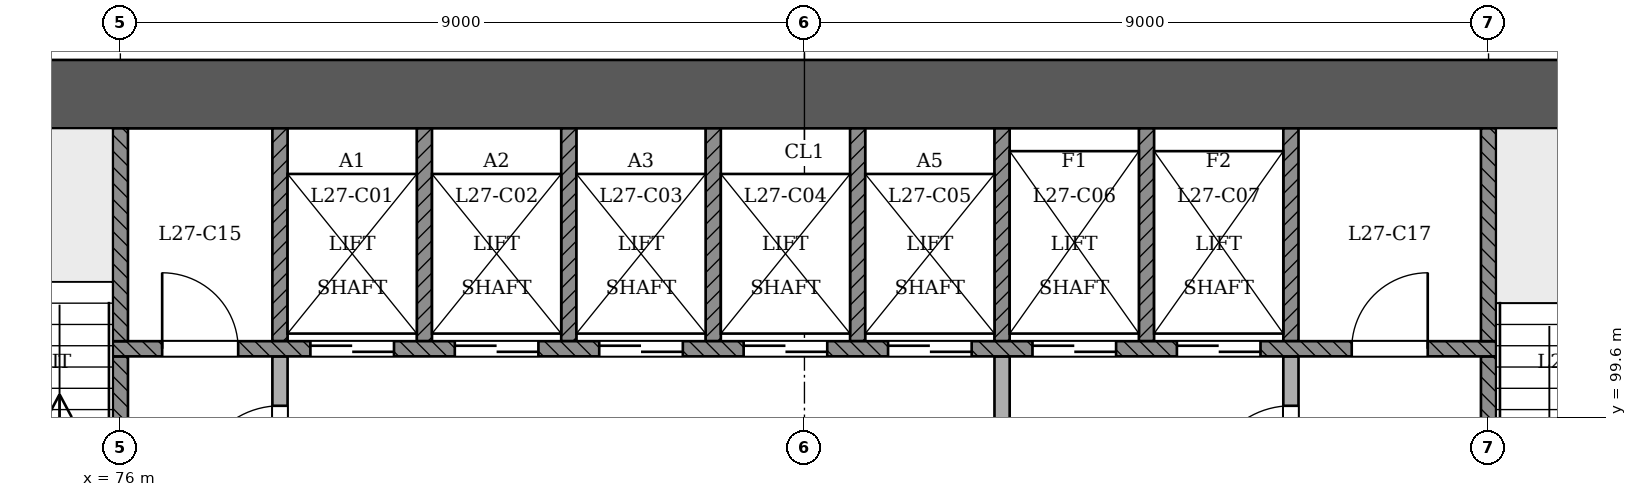
"""IFC4 building model, lengths in metres.
Left out: names, types, materials, properties, quantities, classifications, styles, units other than length and angle.
Written with IfcOpenShell. Run it as: python <this file> out.ifc"""

import sys

from ifc_helpers import new_model, si_unit, direction, frame, frame_2d, origin, place, context, subcontext, project, spatial, rectangle, extrude, element, fill, save


model = new_model("IFC4")
c1 = context("Model", 3, precision=1e-05, world=origin(), true_north=direction((0.0, 1.0)))
c2 = subcontext(c1, "Body", "Model", "MODEL_VIEW")
j1 = project(units=[si_unit("LENGTHUNIT", "METRE"), si_unit("PLANEANGLEUNIT", "RADIAN")], contexts=[c1])
p1 = place(None, origin())
s1 = spatial("IfcSite", under=j1, at=p1, CompositionType="ELEMENT")
p2 = place(p1, origin())
s2 = spatial("IfcBuilding", under=s1, at=p2, CompositionType="ELEMENT")
p3 = place(p2, frame((0.0, 0.0, 108.0)))
s3 = spatial("IfcBuildingStorey", under=s2, at=p3, CompositionType="ELEMENT", Elevation=108.0)
p4 = place(p3, frame((97.45, 103.85, 0.0), z_axis=(0.0, 0.0, 1.0), x_axis=(-1.0, 0.0, 0.0)))
e1 = element("IfcWall", 1, at=p4, inside=s3, PredefinedType="SHEAR", context=c2, shape_type="SweptSolid", body=[
    extrude(rectangle(XDim=25.35, YDim=0.9, at=frame_2d((12.675, 0.0))), origin(), (0.0, 0.0, 1.0), 3.6),
])
p5 = place(p3, frame((87.6, 93.4, 0.0), z_axis=(0.0, 0.0, 1.0), x_axis=(0.0, 1.0, 0.0)))
e2 = element("IfcWall", 2, at=p5, inside=s3, PredefinedType="PARTITIONING", context=c2, shape_type="SweptSolid", body=[
    extrude(rectangle(XDim=7.0, YDim=0.2, at=frame_2d((3.5, 0.0))), origin(), (0.0, 0.0, 1.0), 3.1),
])
p6 = place(p5, frame((4.45, 0.0, 0.0)))
e3 = element("IfcOpeningElement", 3, at=p6, cuts=e2, PredefinedType="OPENING", context=c2, shape_type="SweptSolid", body=[
    extrude(rectangle(XDim=1.1, YDim=2.1, at=frame_2d((0.55, 1.05))), frame((0.0, 0.11, 0.0), z_axis=(0.0, -1.0, 0.0), x_axis=(1.0, 0.0, 0.0)), (0.0, 0.0, 1.0), 0.221),
])
p7 = place(p3, frame((91.4, 96.2, 0.0), z_axis=(0.0, 0.0, 1.0), x_axis=(0.0, 1.0, 0.0)))
e4 = element("IfcWall", 4, at=p7, inside=s3, PredefinedType="PARTITIONING", context=c2, shape_type="SweptSolid", body=[
    extrude(rectangle(XDim=4.2, YDim=0.2, at=frame_2d((2.1, 0.0))), origin(), (0.0, 0.0, 1.0), 3.1),
])
p8 = place(p7, frame((2.45, 0.0, 0.0)))
e5 = element("IfcOpeningElement", 5, at=p8, cuts=e4, PredefinedType="OPENING", context=c2, shape_type="SweptSolid", body=[
    extrude(rectangle(XDim=1.1, YDim=2.1, at=frame_2d((0.55, 1.05))), frame((0.0, 0.11, 0.0), z_axis=(0.0, -1.0, 0.0), x_axis=(1.0, 0.0, 0.0)), (0.0, 0.0, 1.0), 0.221),
])
p9 = place(p3, frame((76.0, 96.7, 0.0), z_axis=(0.0, 0.0, 1.0), x_axis=(0.0, 1.0, 0.0)))
e6 = element("IfcWall", 6, at=p9, inside=s3, PredefinedType="SOLIDWALL", context=c2, shape_type="SweptSolid", body=[
    extrude(rectangle(XDim=3.7, YDim=0.2, at=frame_2d((1.85, 0.0))), origin(), (0.0, 0.0, 1.0), 3.1),
])
p10 = place(p9, frame((0.35, 0.0, 0.0)))
e7 = element("IfcOpeningElement", 7, at=p10, cuts=e6, PredefinedType="OPENING", context=c2, shape_type="SweptSolid", body=[
    extrude(rectangle(XDim=1.1, YDim=2.1, at=frame_2d((0.55, 1.05))), frame((0.0, 0.11, 0.0), z_axis=(0.0, -1.0, 0.0), x_axis=(1.0, 0.0, 0.0)), (0.0, 0.0, 1.0), 0.221),
])
p11 = place(p3, frame((78.1, 96.7, 0.0), z_axis=(0.0, 0.0, 1.0), x_axis=(0.0, 1.0, 0.0)))
e8 = element("IfcWall", 8, at=p11, inside=s3, PredefinedType="PARTITIONING", context=c2, shape_type="SweptSolid", body=[
    extrude(rectangle(XDim=3.7, YDim=0.2, at=frame_2d((1.85, 0.0))), origin(), (0.0, 0.0, 1.0), 3.1),
])
p12 = place(p11, frame((1.95, 0.0, 0.0)))
e9 = element("IfcOpeningElement", 9, at=p12, cuts=e8, PredefinedType="OPENING", context=c2, shape_type="SweptSolid", body=[
    extrude(rectangle(XDim=1.1, YDim=2.1, at=frame_2d((0.55, 1.05))), frame((0.0, 0.11, 0.0), z_axis=(0.0, -1.0, 0.0), x_axis=(1.0, 0.0, 0.0)), (0.0, 0.0, 1.0), 0.221),
])
p13 = place(p3, frame((94.0, 96.7, 0.0), z_axis=(0.0, 0.0, 1.0), x_axis=(0.0, 1.0, 0.0)))
e10 = element("IfcWall", 10, at=p13, inside=s3, PredefinedType="SOLIDWALL", context=c2, shape_type="SweptSolid", body=[
    extrude(rectangle(XDim=3.7, YDim=0.2, at=frame_2d((1.85, 0.0))), origin(), (0.0, 0.0, 1.0), 3.1),
])
p14 = place(p13, frame((0.35, 0.0, 0.0)))
e11 = element("IfcOpeningElement", 11, at=p14, cuts=e10, PredefinedType="OPENING", context=c2, shape_type="SweptSolid", body=[
    extrude(rectangle(XDim=1.1, YDim=2.1, at=frame_2d((0.55, 1.05))), frame((0.0, 0.11, 0.0), z_axis=(0.0, -1.0, 0.0), x_axis=(1.0, 0.0, 0.0)), (0.0, 0.0, 1.0), 0.221),
])
p15 = place(p3, frame((75.9, 100.5, 0.0), z_axis=(0.0, 0.0, 1.0), x_axis=(1.0, 0.0, 0.0)))
e12 = element("IfcWall", 12, at=p15, inside=s3, PredefinedType="SOLIDWALL", context=c2, shape_type="SweptSolid", body=[
    extrude(rectangle(XDim=18.2, YDim=0.2, at=frame_2d((9.1, 0.0))), origin(), (0.0, 0.0, 1.0), 3.1),
])
p16 = place(p15, frame((2.6, 0.0, 0.0)))
e13 = element("IfcOpeningElement", 13, at=p16, cuts=e12, PredefinedType="OPENING", context=c2, shape_type="SweptSolid", body=[
    extrude(rectangle(XDim=1.1, YDim=2.1, at=frame_2d((0.55, 1.05))), frame((0.0, 0.11, 0.0), z_axis=(0.0, -1.0, 0.0), x_axis=(1.0, 0.0, 0.0)), (0.0, 0.0, 1.0), 0.221),
])
p17 = place(p15, frame((4.5, 0.0, 0.0)))
e14 = element("IfcOpeningElement", 14, at=p17, cuts=e12, PredefinedType="OPENING", context=c2, shape_type="SweptSolid", body=[
    extrude(rectangle(XDim=1.1, YDim=2.1, at=frame_2d((0.55, 1.05))), frame((0.0, 0.11, 0.0), z_axis=(0.0, -1.0, 0.0), x_axis=(1.0, 0.0, 0.0)), (0.0, 0.0, 1.0), 0.221),
])
p18 = place(p15, frame((6.4, 0.0, 0.0)))
e15 = element("IfcOpeningElement", 15, at=p18, cuts=e12, PredefinedType="OPENING", context=c2, shape_type="SweptSolid", body=[
    extrude(rectangle(XDim=1.1, YDim=2.1, at=frame_2d((0.55, 1.05))), frame((0.0, 0.11, 0.0), z_axis=(0.0, -1.0, 0.0), x_axis=(1.0, 0.0, 0.0)), (0.0, 0.0, 1.0), 0.221),
])
p19 = place(p15, frame((8.3, 0.0, 0.0)))
e16 = element("IfcOpeningElement", 16, at=p19, cuts=e12, PredefinedType="OPENING", context=c2, shape_type="SweptSolid", body=[
    extrude(rectangle(XDim=1.1, YDim=2.1, at=frame_2d((0.55, 1.05))), frame((0.0, 0.11, 0.0), z_axis=(0.0, -1.0, 0.0), x_axis=(1.0, 0.0, 0.0)), (0.0, 0.0, 1.0), 0.221),
])
p20 = place(p15, frame((10.2, 0.0, 0.0)))
e17 = element("IfcOpeningElement", 17, at=p20, cuts=e12, PredefinedType="OPENING", context=c2, shape_type="SweptSolid", body=[
    extrude(rectangle(XDim=1.1, YDim=2.1, at=frame_2d((0.55, 1.05))), frame((0.0, 0.11, 0.0), z_axis=(0.0, -1.0, 0.0), x_axis=(1.0, 0.0, 0.0)), (0.0, 0.0, 1.0), 0.221),
])
p21 = place(p15, frame((12.1, 0.0, 0.0)))
e18 = element("IfcOpeningElement", 18, at=p21, cuts=e12, PredefinedType="OPENING", context=c2, shape_type="SweptSolid", body=[
    extrude(rectangle(XDim=1.1, YDim=2.1, at=frame_2d((0.55, 1.05))), frame((0.0, 0.11, 0.0), z_axis=(0.0, -1.0, 0.0), x_axis=(1.0, 0.0, 0.0)), (0.0, 0.0, 1.0), 0.221),
])
p22 = place(p15, frame((14.0, 0.0, 0.0)))
e19 = element("IfcOpeningElement", 19, at=p22, cuts=e12, PredefinedType="OPENING", context=c2, shape_type="SweptSolid", body=[
    extrude(rectangle(XDim=1.1, YDim=2.1, at=frame_2d((0.55, 1.05))), frame((0.0, 0.11, 0.0), z_axis=(0.0, -1.0, 0.0), x_axis=(1.0, 0.0, 0.0)), (0.0, 0.0, 1.0), 0.221),
])
p23 = place(p15, frame((0.65, 0.0, 0.0)))
e20 = element("IfcOpeningElement", 20, at=p23, cuts=e12, PredefinedType="OPENING", context=c2, shape_type="SweptSolid", body=[
    extrude(rectangle(XDim=1.0, YDim=2.1, at=frame_2d((0.5, 1.05))), frame((0.0, 0.11, 0.0), z_axis=(0.0, -1.0, 0.0), x_axis=(1.0, 0.0, 0.0)), (0.0, 0.0, 1.0), 0.221),
])
p24 = place(p15, frame((16.3, 0.0, 0.0)))
e21 = element("IfcOpeningElement", 21, at=p24, cuts=e12, PredefinedType="OPENING", context=c2, shape_type="SweptSolid", body=[
    extrude(rectangle(XDim=1.0, YDim=2.1, at=frame_2d((0.5, 1.05))), frame((0.0, 0.11, 0.0), z_axis=(0.0, -1.0, 0.0), x_axis=(1.0, 0.0, 0.0)), (0.0, 0.0, 1.0), 0.221),
])
for number, where, z_axis, x_axis in (
    (22, (76.0, 100.6, 0.0), (0.0, 0.0, 1.0), (0.0, 1.0, 0.0)),
    (23, (78.1, 100.6, 0.0), (0.0, 0.0, 1.0), (0.0, 1.0, 0.0)),
    (24, (80.0, 100.6, 0.0), (0.0, 0.0, 1.0), (0.0, 1.0, 0.0)),
    (25, (81.9, 100.6, 0.0), (0.0, 0.0, 1.0), (0.0, 1.0, 0.0)),
    (26, (83.8, 100.6, 0.0), (0.0, 0.0, 1.0), (0.0, 1.0, 0.0)),
    (27, (85.7, 100.6, 0.0), (0.0, 0.0, 1.0), (0.0, 1.0, 0.0)),
    (28, (87.6, 100.6, 0.0), (0.0, 0.0, 1.0), (0.0, 1.0, 0.0)),
    (29, (89.5, 100.6, 0.0), (0.0, 0.0, 1.0), (0.0, 1.0, 0.0)),
    (30, (91.4, 100.6, 0.0), (0.0, 0.0, 1.0), (0.0, 1.0, 0.0)),
    (31, (94.0, 100.6, 0.0), (0.0, 0.0, 1.0), (0.0, 1.0, 0.0)),
):
    element("IfcWall", number, at=place(p3, frame(where, z_axis=z_axis, x_axis=x_axis)), inside=s3, PredefinedType="SOLIDWALL", context=c2, shape_type="SweptSolid", body=[
        extrude(rectangle(XDim=2.8, YDim=0.2, at=frame_2d((1.4, 0.0))), origin(), (0.0, 0.0, 1.0), 3.1),
    ])
p25 = place(p16, origin())
e32 = element("IfcDoor", 32, at=p25, inside=s3, OperationType="SLIDING_TO_RIGHT", PredefinedType="NOTDEFINED", context=c2, shape_type="SweptSolid", body=[
    extrude(rectangle(XDim=1.1, YDim=2.1, at=frame_2d((0.55, 1.05))), frame((0.0, 0.025, 0.0), z_axis=(0.0, -1.0, 0.0), x_axis=(1.0, 0.0, 0.0)), (0.0, 0.0, 1.0), 0.05),
])
fill(e13, e32)
p26 = place(p17, origin())
e33 = element("IfcDoor", 33, at=p26, inside=s3, OperationType="SLIDING_TO_LEFT", PredefinedType="NOTDEFINED", context=c2, shape_type="SweptSolid", body=[
    extrude(rectangle(XDim=1.1, YDim=2.1, at=frame_2d((0.55, 1.05))), frame((0.0, 0.025, 0.0), z_axis=(0.0, -1.0, 0.0), x_axis=(1.0, 0.0, 0.0)), (0.0, 0.0, 1.0), 0.05),
])
fill(e14, e33)
p27 = place(p18, origin())
e34 = element("IfcDoor", 34, at=p27, inside=s3, OperationType="SLIDING_TO_RIGHT", PredefinedType="NOTDEFINED", context=c2, shape_type="SweptSolid", body=[
    extrude(rectangle(XDim=1.1, YDim=2.1, at=frame_2d((0.55, 1.05))), frame((0.0, 0.025, 0.0), z_axis=(0.0, -1.0, 0.0), x_axis=(1.0, 0.0, 0.0)), (0.0, 0.0, 1.0), 0.05),
])
fill(e15, e34)
p28 = place(p19, origin())
e35 = element("IfcDoor", 35, at=p28, inside=s3, OperationType="SLIDING_TO_LEFT", PredefinedType="NOTDEFINED", context=c2, shape_type="SweptSolid", body=[
    extrude(rectangle(XDim=1.1, YDim=2.1, at=frame_2d((0.55, 1.05))), frame((0.0, 0.025, 0.0), z_axis=(0.0, -1.0, 0.0), x_axis=(1.0, 0.0, 0.0)), (0.0, 0.0, 1.0), 0.05),
])
fill(e16, e35)
p29 = place(p20, origin())
e36 = element("IfcDoor", 36, at=p29, inside=s3, OperationType="SLIDING_TO_RIGHT", PredefinedType="NOTDEFINED", context=c2, shape_type="SweptSolid", body=[
    extrude(rectangle(XDim=1.1, YDim=2.1, at=frame_2d((0.55, 1.05))), frame((0.0, 0.025, 0.0), z_axis=(0.0, -1.0, 0.0), x_axis=(1.0, 0.0, 0.0)), (0.0, 0.0, 1.0), 0.05),
])
fill(e17, e36)
p30 = place(p21, origin())
e37 = element("IfcDoor", 37, at=p30, inside=s3, OperationType="SLIDING_TO_RIGHT", PredefinedType="NOTDEFINED", context=c2, shape_type="SweptSolid", body=[
    extrude(rectangle(XDim=1.1, YDim=2.1, at=frame_2d((0.55, 1.05))), frame((0.0, 0.025, 0.0), z_axis=(0.0, -1.0, 0.0), x_axis=(1.0, 0.0, 0.0)), (0.0, 0.0, 1.0), 0.05),
])
fill(e18, e37)
p31 = place(p22, origin())
e38 = element("IfcDoor", 38, at=p31, inside=s3, OperationType="SLIDING_TO_LEFT", PredefinedType="NOTDEFINED", context=c2, shape_type="SweptSolid", body=[
    extrude(rectangle(XDim=1.1, YDim=2.1, at=frame_2d((0.55, 1.05))), frame((0.0, 0.025, 0.0), z_axis=(0.0, -1.0, 0.0), x_axis=(1.0, 0.0, 0.0)), (0.0, 0.0, 1.0), 0.05),
])
fill(e19, e38)
p32 = place(p12, origin())
e39 = element("IfcDoor", 39, at=p32, inside=s3, OperationType="SINGLE_SWING_LEFT", PredefinedType="NOTDEFINED", context=c2, shape_type="SweptSolid", body=[
    extrude(rectangle(XDim=1.1, YDim=2.1, at=frame_2d((0.55, 1.05))), frame((0.0, 0.025, 0.0), z_axis=(0.0, -1.0, 0.0), x_axis=(1.0, 0.0, 0.0)), (0.0, 0.0, 1.0), 0.05),
])
fill(e9, e39)
p33 = place(p8, origin())
e40 = element("IfcDoor", 40, at=p33, inside=s3, OperationType="SINGLE_SWING_LEFT", PredefinedType="NOTDEFINED", context=c2, shape_type="SweptSolid", body=[
    extrude(rectangle(XDim=1.1, YDim=2.1, at=frame_2d((0.55, 1.05))), frame((0.0, 0.025, 0.0), z_axis=(0.0, -1.0, 0.0), x_axis=(1.0, 0.0, 0.0)), (0.0, 0.0, 1.0), 0.05),
])
fill(e5, e40)
p34 = place(p23, origin())
e41 = element("IfcDoor", 41, at=p34, inside=s3, OperationType="SINGLE_SWING_LEFT", PredefinedType="NOTDEFINED", context=c2, shape_type="SweptSolid", body=[
    extrude(rectangle(XDim=1.0, YDim=2.1, at=frame_2d((0.5, 1.05))), frame((0.0, 0.025, 0.0), z_axis=(0.0, -1.0, 0.0), x_axis=(1.0, 0.0, 0.0)), (0.0, 0.0, 1.0), 0.05),
])
fill(e20, e41)
p35 = place(p24, origin())
e42 = element("IfcDoor", 42, at=p35, inside=s3, OperationType="SINGLE_SWING_RIGHT", PredefinedType="NOTDEFINED", context=c2, shape_type="SweptSolid", body=[
    extrude(rectangle(XDim=1.0, YDim=2.1, at=frame_2d((0.5, 1.05))), frame((0.0, 0.025, 0.0), z_axis=(0.0, -1.0, 0.0), x_axis=(1.0, 0.0, 0.0)), (0.0, 0.0, 1.0), 0.05),
])
fill(e21, e42)
save(model, sys.argv[1])
